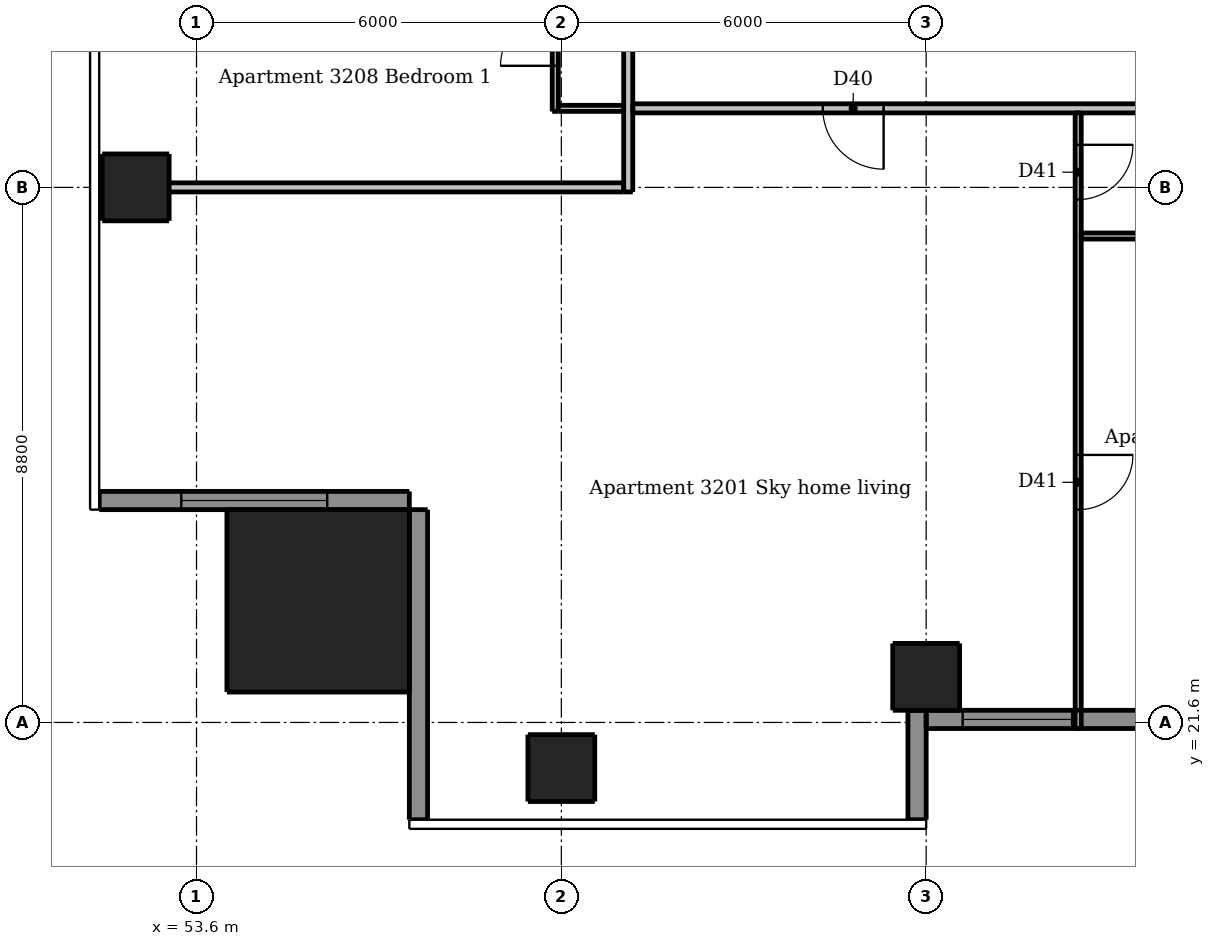
"""IFC4 building model, lengths in metres.
Left out: names, types, materials, properties, quantities, classifications, styles, units other than length and angle.
Written with IfcOpenShell. Run it as: python <this file> out.ifc"""

import sys

from ifc_helpers import new_model, si_unit, direction, frame, frame_2d, origin, origin_2d, place, context, subcontext, project, spatial, rectangle, extrude, element, fill, save


model = new_model("IFC4")
c1 = context("Model", 3, precision=1e-05, world=origin(), true_north=direction((0.0, 1.0)))
c2 = subcontext(c1, "Body", "Model", "MODEL_VIEW")
j1 = project(units=[si_unit("LENGTHUNIT", "METRE"), si_unit("PLANEANGLEUNIT", "RADIAN")], contexts=[c1])
p1 = place(None, origin())
s1 = spatial("IfcSite", under=j1, at=p1, CompositionType="ELEMENT")
p2 = place(p1, origin())
s2 = spatial("IfcBuilding", under=s1, at=p2, CompositionType="ELEMENT")
p3 = place(p2, frame((0.0, 0.0, 118.3)))
s3 = spatial("IfcBuildingStorey", under=s2, at=p3, CompositionType="ELEMENT", Elevation=118.3)
for number, where, z_axis, x_axis in (
    (1, (59.6, 20.85, 0.0), (0.0, 0.0, 1.0), (1.0, 0.0, 0.0)),
    (2, (65.6, 22.35, 0.0), (0.0, 0.0, 1.0), (1.0, 0.0, 0.0)),
    (3, (52.6, 30.4, 0.0), (0.0, 0.0, 1.0), (1.0, 0.0, 0.0)),
):
    element("IfcColumn", number, at=place(p3, frame(where, z_axis=z_axis, x_axis=x_axis)), inside=s3, PredefinedType="COLUMN", context=c2, shape_type="SweptSolid", body=[
        extrude(rectangle(XDim=1.1, YDim=1.1, at=origin_2d()), origin(), (0.0, 0.0, 1.0), 3.05),
    ])
p4 = place(p3, frame((55.6, 23.6, 0.0), z_axis=(0.0, 0.0, 1.0), x_axis=(1.0, 0.0, 0.0)))
e4 = element("IfcColumn", 4, at=p4, inside=s3, PredefinedType="COLUMN", context=c2, shape_type="SweptSolid", body=[
    extrude(rectangle(XDim=3.0, YDim=3.0, at=origin_2d()), origin(), (0.0, 0.0, 1.0), 3.3),
])
p5 = place(p3, frame((65.45, 20.0, 0.0), z_axis=(0.0, 0.0, 1.0), x_axis=(0.0, 1.0, 0.0)))
e5 = element("IfcWall", 5, at=p5, inside=s3, PredefinedType="SOLIDWALL", context=c2, shape_type="SweptSolid", body=[
    extrude(rectangle(XDim=1.8, YDim=0.3, at=frame_2d((0.9, 0.0))), origin(), (0.0, 0.0, 1.0), 3.05),
])
p6 = place(p3, frame((52.0, 25.25, 0.0), z_axis=(0.0, 0.0, 1.0), x_axis=(1.0, 0.0, 0.0)))
e6 = element("IfcWall", 6, at=p6, inside=s3, PredefinedType="SOLIDWALL", context=c2, shape_type="SweptSolid", body=[
    extrude(rectangle(XDim=5.1, YDim=0.3, at=frame_2d((2.55, 0.0))), origin(), (0.0, 0.0, 1.0), 3.05),
])
p7 = place(p6, frame((1.35, 0.0, 0.15)))
e7 = element("IfcOpeningElement", 7, at=p7, cuts=e6, PredefinedType="OPENING", context=c2, shape_type="SweptSolid", body=[
    extrude(rectangle(XDim=2.4, YDim=2.1, at=frame_2d((1.2, 1.05))), frame((0.0, 0.16, 0.0), z_axis=(0.0, -1.0, 0.0), x_axis=(1.0, 0.0, 0.0)), (0.0, 0.0, 1.0), 0.32),
])
p8 = place(p3, frame((57.25, 25.1, 0.0), z_axis=(0.0, 0.0, 1.0), x_axis=(0.0, -1.0, 0.0)))
e8 = element("IfcWall", 8, at=p8, inside=s3, PredefinedType="SOLIDWALL", context=c2, shape_type="SweptSolid", body=[
    extrude(rectangle(XDim=5.1, YDim=0.3, at=frame_2d((2.55, 0.0))), origin(), (0.0, 0.0, 1.0), 3.05),
])
p9 = place(p3, frame((65.6, 21.65, 0.0), z_axis=(0.0, 0.0, 1.0), x_axis=(1.0, 0.0, 0.0)))
e9 = element("IfcWall", 9, at=p9, inside=s3, PredefinedType="SOLIDWALL", context=c2, shape_type="SweptSolid", body=[
    extrude(rectangle(XDim=5.7, YDim=0.3, at=frame_2d((2.85, 0.0))), origin(), (0.0, 0.0, 1.0), 3.05),
])
p10 = place(p9, frame((0.6, 0.0, 0.15)))
e10 = element("IfcOpeningElement", 10, at=p10, cuts=e9, PredefinedType="OPENING", context=c2, shape_type="SweptSolid", body=[
    extrude(rectangle(XDim=1.8, YDim=2.1, at=frame_2d((0.9, 1.05))), frame((0.0, 0.16, 0.0), z_axis=(0.0, -1.0, 0.0), x_axis=(1.0, 0.0, 0.0)), (0.0, 0.0, 1.0), 0.32),
])
p11 = place(p9, frame((3.6, 0.0, 0.15)))
e11 = element("IfcOpeningElement", 11, at=p11, cuts=e9, PredefinedType="OPENING", context=c2, shape_type="SweptSolid", body=[
    extrude(rectangle(XDim=1.8, YDim=2.1, at=frame_2d((0.9, 1.05))), frame((0.0, 0.16, 0.0), z_axis=(0.0, -1.0, 0.0), x_axis=(1.0, 0.0, 0.0)), (0.0, 0.0, 1.0), 0.32),
])
p12 = place(p3, frame((59.5, 31.65, 0.0), z_axis=(0.0, 0.0, 1.0), x_axis=(0.0, 1.0, 0.0)))
e12 = element("IfcWall", 12, at=p12, inside=s3, PredefinedType="PARTITIONING", context=c2, shape_type="SweptSolid", body=[
    extrude(rectangle(XDim=16.675, YDim=0.1, at=frame_2d((8.337, 0.0))), origin(), (0.0, 0.0, 1.0), 2.51),
])
p13 = place(p12, frame((9.7, 0.0, 0.0)))
e13 = element("IfcOpeningElement", 13, at=p13, cuts=e12, PredefinedType="OPENING", context=c2, shape_type="SweptSolid", body=[
    extrude(rectangle(XDim=0.9, YDim=2.1, at=frame_2d((0.45, 1.05))), frame((0.0, 0.06, 0.0), z_axis=(0.0, -1.0, 0.0), x_axis=(1.0, 0.0, 0.0)), (0.0, 0.0, 1.0), 0.12),
])
p14 = place(p12, frame((14.8, 0.0, 0.0)))
e14 = element("IfcOpeningElement", 14, at=p14, cuts=e12, PredefinedType="OPENING", context=c2, shape_type="SweptSolid", body=[
    extrude(rectangle(XDim=0.9, YDim=2.1, at=frame_2d((0.45, 1.05))), frame((0.0, 0.06, 0.0), z_axis=(0.0, -1.0, 0.0), x_axis=(1.0, 0.0, 0.0)), (0.0, 0.0, 1.0), 0.12),
])
p15 = place(p12, frame((12.4, 0.0, 0.0)))
e15 = element("IfcOpeningElement", 15, at=p15, cuts=e12, PredefinedType="OPENING", context=c2, shape_type="SweptSolid", body=[
    extrude(rectangle(XDim=0.9, YDim=2.1, at=frame_2d((0.45, 1.05))), frame((0.0, 0.06, 0.0), z_axis=(0.0, -1.0, 0.0), x_axis=(1.0, 0.0, 0.0)), (0.0, 0.0, 1.0), 0.12),
])
p16 = place(p12, frame((5.2, 0.0, 0.0)))
e16 = element("IfcOpeningElement", 16, at=p16, cuts=e12, PredefinedType="OPENING", context=c2, shape_type="SweptSolid", body=[
    extrude(rectangle(XDim=0.9, YDim=2.1, at=frame_2d((0.45, 1.05))), frame((0.0, 0.06, 0.0), z_axis=(0.0, -1.0, 0.0), x_axis=(1.0, 0.0, 0.0)), (0.0, 0.0, 1.0), 0.12),
])
p17 = place(p12, frame((7.05, 0.0, 0.0)))
e17 = element("IfcOpeningElement", 17, at=p17, cuts=e12, PredefinedType="OPENING", context=c2, shape_type="SweptSolid", body=[
    extrude(rectangle(XDim=0.8, YDim=2.1, at=frame_2d((0.4, 1.05))), frame((0.0, 0.06, 0.0), z_axis=(0.0, -1.0, 0.0), x_axis=(1.0, 0.0, 0.0)), (0.0, 0.0, 1.0), 0.12),
])
p18 = place(p12, frame((0.75, 0.0, 0.0)))
e18 = element("IfcOpeningElement", 18, at=p18, cuts=e12, PredefinedType="OPENING", context=c2, shape_type="SweptSolid", body=[
    extrude(rectangle(XDim=0.9, YDim=2.1, at=frame_2d((0.45, 1.05))), frame((0.0, 0.06, 0.0), z_axis=(0.0, -1.0, 0.0), x_axis=(1.0, 0.0, 0.0)), (0.0, 0.0, 1.0), 0.12),
])
p19 = place(p12, frame((3.15, 0.0, 0.0)))
e19 = element("IfcOpeningElement", 19, at=p19, cuts=e12, PredefinedType="OPENING", context=c2, shape_type="SweptSolid", body=[
    extrude(rectangle(XDim=0.8, YDim=2.1, at=frame_2d((0.4, 1.05))), frame((0.0, 0.06, 0.0), z_axis=(0.0, -1.0, 0.0), x_axis=(1.0, 0.0, 0.0)), (0.0, 0.0, 1.0), 0.12),
])
p20 = place(p3, frame((68.1, 31.625, 0.0), z_axis=(0.0, 0.0, 1.0), x_axis=(0.0, -1.0, 0.0)))
e20 = element("IfcWall", 20, at=p20, inside=s3, PredefinedType="PARTITIONING", context=c2, shape_type="SweptSolid", body=[
    extrude(rectangle(XDim=10.125, YDim=0.1, at=frame_2d((5.062, 0.0))), origin(), (0.0, 0.0, 1.0), 3.05),
])
p21 = place(p20, frame((0.525, 0.0, 0.0)))
e21 = element("IfcOpeningElement", 21, at=p21, cuts=e20, PredefinedType="OPENING", context=c2, shape_type="SweptSolid", body=[
    extrude(rectangle(XDim=0.9, YDim=2.1, at=frame_2d((0.45, 1.05))), frame((0.0, 0.06, 0.0), z_axis=(0.0, -1.0, 0.0), x_axis=(1.0, 0.0, 0.0)), (0.0, 0.0, 1.0), 0.12),
])
p22 = place(p20, frame((5.625, 0.0, 0.0)))
e22 = element("IfcOpeningElement", 22, at=p22, cuts=e20, PredefinedType="OPENING", context=c2, shape_type="SweptSolid", body=[
    extrude(rectangle(XDim=0.9, YDim=2.1, at=frame_2d((0.45, 1.05))), frame((0.0, 0.06, 0.0), z_axis=(0.0, -1.0, 0.0), x_axis=(1.0, 0.0, 0.0)), (0.0, 0.0, 1.0), 0.12),
])
p23 = place(p3, frame((59.55, 31.7, 0.0), z_axis=(0.0, 0.0, 1.0), x_axis=(1.0, 0.0, 0.0)))
e23 = element("IfcWall", 23, at=p23, inside=s3, PredefinedType="PARTITIONING", context=c2, shape_type="SweptSolid", body=[
    extrude(rectangle(XDim=1.075, YDim=0.1, at=frame_2d((0.538, 0.0))), origin(), (0.0, 0.0, 1.0), 3.05),
])
p24 = place(p3, frame((68.15, 29.6, 0.0), z_axis=(0.0, 0.0, 1.0), x_axis=(1.0, 0.0, 0.0)))
e24 = element("IfcWall", 24, at=p24, inside=s3, PredefinedType="PARTITIONING", context=c2, shape_type="SweptSolid", body=[
    extrude(rectangle(XDim=6.475, YDim=0.1, at=frame_2d((3.238, 0.0))), origin(), (0.0, 0.0, 1.0), 3.05),
])
p25 = place(p24, frame((4.05, 0.0, 0.0)))
e25 = element("IfcOpeningElement", 25, at=p25, cuts=e24, PredefinedType="OPENING", context=c2, shape_type="SweptSolid", body=[
    extrude(rectangle(XDim=0.8, YDim=2.1, at=frame_2d((0.4, 1.05))), frame((0.0, 0.06, 0.0), z_axis=(0.0, -1.0, 0.0), x_axis=(1.0, 0.0, 0.0)), (0.0, 0.0, 1.0), 0.12),
])
p26 = place(p3, frame((60.7, 30.325, 0.0), z_axis=(0.0, 0.0, 1.0), x_axis=(0.0, 1.0, 0.0)))
e26 = element("IfcWall", 26, at=p26, inside=s3, PredefinedType="PARTITIONING", context=c2, shape_type="SweptSolid", body=[
    extrude(rectangle(XDim=28.9, YDim=0.15, at=frame_2d((14.45, 0.0))), origin(), (0.0, 0.0, 1.0), 3.05),
])
p27 = place(p26, frame((9.225, 0.0, 0.0)))
e27 = element("IfcOpeningElement", 27, at=p27, cuts=e26, PredefinedType="OPENING", context=c2, shape_type="SweptSolid", body=[
    extrude(rectangle(XDim=1.0, YDim=2.1, at=frame_2d((0.5, 1.05))), frame((0.0, 0.085, 0.0), z_axis=(0.0, -1.0, 0.0), x_axis=(1.0, 0.0, 0.0)), (0.0, 0.0, 1.0), 0.17),
])
p28 = place(p26, frame((26.025, 0.0, 0.0)))
e28 = element("IfcOpeningElement", 28, at=p28, cuts=e26, PredefinedType="OPENING", context=c2, shape_type="SweptSolid", body=[
    extrude(rectangle(XDim=1.0, YDim=2.1, at=frame_2d((0.5, 1.05))), frame((0.0, 0.085, 0.0), z_axis=(0.0, -1.0, 0.0), x_axis=(1.0, 0.0, 0.0)), (0.0, 0.0, 1.0), 0.17),
])
p29 = place(p3, frame((89.525, 31.7, 0.0), z_axis=(0.0, 0.0, 1.0), x_axis=(-1.0, 0.0, 0.0)))
e29 = element("IfcWall", 29, at=p29, inside=s3, PredefinedType="PARTITIONING", context=c2, shape_type="SweptSolid", body=[
    extrude(rectangle(XDim=28.75, YDim=0.15, at=frame_2d((14.375, 0.0))), origin(), (0.0, 0.0, 1.0), 3.05),
])
p30 = place(p29, frame((24.625, 0.0, 0.0)))
e30 = element("IfcOpeningElement", 30, at=p30, cuts=e29, PredefinedType="OPENING", context=c2, shape_type="SweptSolid", body=[
    extrude(rectangle(XDim=1.0, YDim=2.1, at=frame_2d((0.5, 1.05))), frame((0.0, 0.085, 0.0), z_axis=(0.0, -1.0, 0.0), x_axis=(1.0, 0.0, 0.0)), (0.0, 0.0, 1.0), 0.17),
])
p31 = place(p29, frame((5.425, 0.0, 0.0)))
e31 = element("IfcOpeningElement", 31, at=p31, cuts=e29, PredefinedType="OPENING", context=c2, shape_type="SweptSolid", body=[
    extrude(rectangle(XDim=1.0, YDim=2.1, at=frame_2d((0.5, 1.05))), frame((0.0, 0.085, 0.0), z_axis=(0.0, -1.0, 0.0), x_axis=(1.0, 0.0, 0.0)), (0.0, 0.0, 1.0), 0.17),
])
p32 = place(p3, frame((52.0, 30.4, 0.0), z_axis=(0.0, 0.0, 1.0), x_axis=(1.0, 0.0, 0.0)))
e32 = element("IfcWall", 32, at=p32, inside=s3, PredefinedType="PARTITIONING", context=c2, shape_type="SweptSolid", body=[
    extrude(rectangle(XDim=8.625, YDim=0.15, at=frame_2d((4.312, 0.0))), origin(), (0.0, 0.0, 1.0), 2.647),
])
p33 = place(p7, origin())
e33 = element("IfcWindow", 33, at=p33, inside=s3, PartitioningType="DOUBLE_PANEL_VERTICAL", PredefinedType="WINDOW", context=c2, shape_type="SweptSolid", body=[
    extrude(rectangle(XDim=2.4, YDim=2.1, at=frame_2d((1.2, 1.05))), frame((0.0, 0.03, 0.0), z_axis=(0.0, -1.0, 0.0), x_axis=(1.0, 0.0, 0.0)), (0.0, 0.0, 1.0), 0.06),
])
fill(e7, e33)
p34 = place(p10, origin())
e34 = element("IfcWindow", 34, at=p34, inside=s3, PartitioningType="DOUBLE_PANEL_VERTICAL", PredefinedType="WINDOW", context=c2, shape_type="SweptSolid", body=[
    extrude(rectangle(XDim=1.8, YDim=2.1, at=frame_2d((0.9, 1.05))), frame((0.0, 0.03, 0.0), z_axis=(0.0, -1.0, 0.0), x_axis=(1.0, 0.0, 0.0)), (0.0, 0.0, 1.0), 0.06),
])
fill(e10, e34)
p35 = place(p30, origin())
e35 = element("IfcDoor", 35, at=p35, inside=s3, OperationType="SINGLE_SWING_LEFT", PredefinedType="DOOR", context=c2, shape_type="SweptSolid", body=[
    extrude(rectangle(XDim=1.0, YDim=2.1, at=frame_2d((0.5, 1.05))), frame((0.0, 0.025, 0.0), z_axis=(0.0, -1.0, 0.0), x_axis=(1.0, 0.0, 0.0)), (0.0, 0.0, 1.0), 0.05),
])
fill(e30, e35)
p36 = place(p21, origin())
e36 = element("IfcDoor", 36, at=p36, inside=s3, OperationType="SINGLE_SWING_LEFT", PredefinedType="DOOR", context=c2, shape_type="SweptSolid", body=[
    extrude(rectangle(XDim=0.9, YDim=2.1, at=frame_2d((0.45, 1.05))), frame((0.0, 0.025, 0.0), z_axis=(0.0, -1.0, 0.0), x_axis=(1.0, 0.0, 0.0)), (0.0, 0.0, 1.0), 0.05),
])
fill(e21, e36)
p37 = place(p22, origin())
e37 = element("IfcDoor", 37, at=p37, inside=s3, OperationType="SINGLE_SWING_LEFT", PredefinedType="DOOR", context=c2, shape_type="SweptSolid", body=[
    extrude(rectangle(XDim=0.9, YDim=2.1, at=frame_2d((0.45, 1.05))), frame((0.0, 0.025, 0.0), z_axis=(0.0, -1.0, 0.0), x_axis=(1.0, 0.0, 0.0)), (0.0, 0.0, 1.0), 0.05),
])
fill(e22, e37)
p38 = place(p18, origin())
e38 = element("IfcDoor", 38, at=p38, inside=s3, OperationType="SINGLE_SWING_LEFT", PredefinedType="DOOR", context=c2, shape_type="SweptSolid", body=[
    extrude(rectangle(XDim=0.9, YDim=2.1, at=frame_2d((0.45, 1.05))), frame((0.0, 0.025, 0.0), z_axis=(0.0, -1.0, 0.0), x_axis=(1.0, 0.0, 0.0)), (0.0, 0.0, 1.0), 0.05),
])
fill(e18, e38)
save(model, sys.argv[1])
